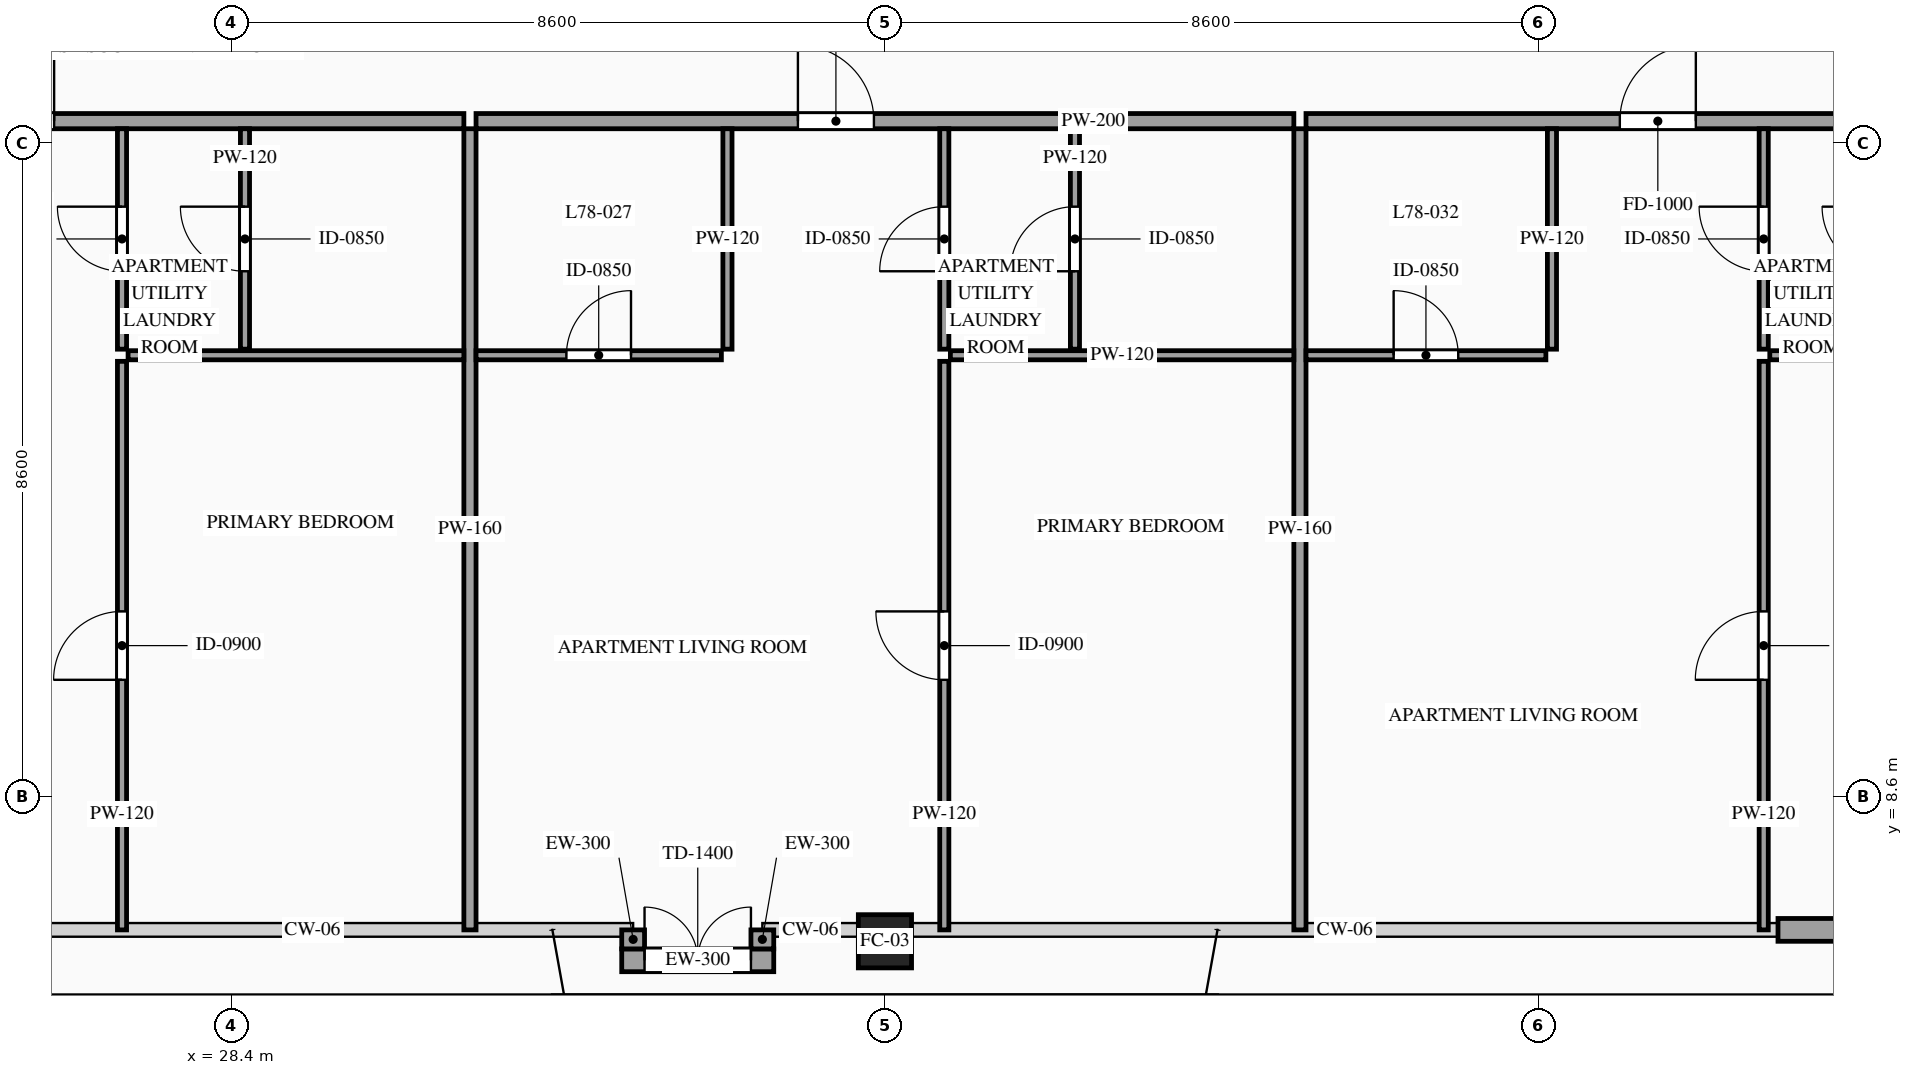
"""IFC4 building model, lengths in metres.
Left out: names, types, materials, properties, quantities, classifications, styles, units other than length and angle.
Written with IfcOpenShell. Run it as: python <this file> out.ifc"""

import sys

from ifc_helpers import new_model, si_unit, direction, frame, frame_2d, origin, origin_2d, place, context, subcontext, project, spatial, rectangle, hollow_rectangle, extrude, source, transform, mapped, element, fill, save


model = new_model("IFC4")
c1 = context("Model", 3, precision=1e-05, world=origin(), true_north=direction((0.0, 1.0)))
c2 = subcontext(c1, "Body", "Model", "MODEL_VIEW")
j1 = project(units=[si_unit("LENGTHUNIT", "METRE"), si_unit("PLANEANGLEUNIT", "RADIAN")], contexts=[c1])
p1 = place(None, origin())
s1 = spatial("IfcSite", under=j1, at=p1, CompositionType="ELEMENT")
p2 = place(p1, origin())
s2 = spatial("IfcBuilding", under=s1, at=p2, CompositionType="ELEMENT")
p3 = place(p2, frame((0.0, 0.0, 292.6)))
s3 = spatial("IfcBuildingStorey", under=s2, at=p3, CompositionType="ELEMENT", Elevation=292.6)
m1 = source(origin(), c2, "Body", "SweptSolid", [
    extrude(hollow_rectangle(XDim=0.7, YDim=0.7, WallThickness=0.032, at=origin_2d()), origin(), (0.0, 0.0, 1.0), 3.5),
])
p4 = place(p3, frame((37.0, 6.7, 0.0), z_axis=(0.0, 0.0, 1.0), x_axis=(1.0, 0.0, 0.0)))
e1 = element("IfcColumn", 1, at=p4, inside=s3, PredefinedType="COLUMN", context=c2, shape_type="MappedRepresentation", body=[
    mapped(m1, transform((0.0, 0.0, 0.0), scale=1.0)),
])
m2 = source(origin(), c2, "Body", "SweptSolid", [
    extrude(rectangle(XDim=3.25, YDim=0.3, at=frame_2d((1.625, 0.0))), origin(), (0.0, 0.0, 1.0), 2.885),
])
p5 = place(p3, frame((48.75, 6.85, 0.0), z_axis=(0.0, 0.0, 1.0), x_axis=(1.0, 0.0, 0.0)))
e2 = element("IfcWall", 2, at=p5, inside=s3, PredefinedType="SOLIDWALL", context=c2, shape_type="MappedRepresentation", body=[
    mapped(m2, transform((0.0, 0.0, 0.0), scale=1.0)),
])
p6 = place(p3, frame((33.537, 6.45, 0.0), z_axis=(0.0, 0.0, 1.0), x_axis=(1.0, 0.0, 0.0)))
e3 = element("IfcWall", 3, at=p6, inside=s3, PredefinedType="SOLIDWALL", context=c2, shape_type="SweptSolid", body=[
    extrude(rectangle(XDim=2.0, YDim=0.3, at=frame_2d((1.0, 0.0))), origin(), (0.0, 0.0, 1.0), 2.885),
])
p7 = place(p6, frame((0.3, 0.0, 0.0)))
e4 = element("IfcOpeningElement", 4, at=p7, cuts=e3, PredefinedType="OPENING", context=c2, shape_type="SweptSolid", body=[
    extrude(rectangle(XDim=1.4, YDim=2.3, at=frame_2d((0.7, 1.15))), frame((0.0, 0.165, 0.0), z_axis=(0.0, -1.0, 0.0), x_axis=(1.0, 0.0, 0.0)), (0.0, 0.0, 1.0), 0.33),
])
m3 = source(origin(), c2, "Body", "SweptSolid", [
    extrude(rectangle(XDim=0.25, YDim=0.3, at=frame_2d((0.125, 0.0))), origin(), (0.0, 0.0, 1.0), 3.28),
])
for number, where, z_axis, x_axis in (
    (5, (33.687, 6.85, 0.0), (0.0, 0.0, 1.0), (0.0, -1.0, 0.0)),
    (6, (35.387, 6.6, 0.0), (0.0, 0.0, 1.0), (0.0, 1.0, 0.0)),
):
    element("IfcWall", number, at=place(p3, frame(where, z_axis=z_axis, x_axis=x_axis)), inside=s3, PredefinedType="SOLIDWALL", context=c2, shape_type="MappedRepresentation", body=[
        mapped(m3, transform((0.0, 0.0, 0.0), scale=1.0)),
    ])
p8 = place(p3, frame((20.94, 17.49, 0.0), z_axis=(0.0, 0.0, 1.0), x_axis=(1.0, 0.0, 0.0)))
e7 = element("IfcWall", 7, at=p8, inside=s3, PredefinedType="PARTITIONING", context=c2, shape_type="SweptSolid", body=[
    extrude(rectangle(XDim=10.52, YDim=0.2, at=frame_2d((5.26, 0.0))), origin(), (0.0, 0.0, 1.0), 3.28),
])
p9 = place(p8, frame((4.129, 0.0, 0.0)))
e8 = element("IfcOpeningElement", 8, at=p9, cuts=e7, PredefinedType="OPENING", context=c2, shape_type="SweptSolid", body=[
    extrude(rectangle(XDim=1.0, YDim=2.2, at=frame_2d((0.5, 1.1))), frame((0.0, 0.115, 0.0), z_axis=(0.0, -1.0, 0.0), x_axis=(1.0, 0.0, 0.0)), (0.0, 0.0, 1.0), 0.23),
])
m4 = source(origin(), c2, "Body", "SweptSolid", [
    extrude(rectangle(XDim=10.54, YDim=0.16, at=frame_2d((5.27, 0.0))), origin(), (0.0, 0.0, 1.0), 3.28),
])
p10 = place(p3, frame((31.54, 6.85, 0.0), z_axis=(0.0, 0.0, 1.0), x_axis=(0.0, 1.0, 0.0)))
e9 = element("IfcWall", 9, at=p10, inside=s3, PredefinedType="PARTITIONING", context=c2, shape_type="MappedRepresentation", body=[
    mapped(m4, transform((0.0, 0.0, 0.0), scale=1.0)),
])
p11 = place(p3, frame((28.58, 14.49, 0.0), z_axis=(0.0, 0.0, 1.0), x_axis=(0.0, 1.0, 0.0)))
e10 = element("IfcWall", 10, at=p11, inside=s3, PredefinedType="PARTITIONING", context=c2, shape_type="SweptSolid", body=[
    extrude(rectangle(XDim=2.9, YDim=0.12, at=frame_2d((1.45, 0.0))), origin(), (0.0, 0.0, 1.0), 3.28),
])
p12 = place(p11, frame((1.025, 0.0, 0.0)))
e11 = element("IfcOpeningElement", 11, at=p12, cuts=e10, PredefinedType="OPENING", context=c2, shape_type="SweptSolid", body=[
    extrude(rectangle(XDim=0.85, YDim=2.1, at=frame_2d((0.425, 1.05))), frame((0.0, 0.075, 0.0), z_axis=(0.0, -1.0, 0.0), x_axis=(1.0, 0.0, 0.0)), (0.0, 0.0, 1.0), 0.15),
])
m5 = source(origin(), c2, "Body", "SweptSolid", [
    extrude(rectangle(XDim=4.418, YDim=0.12, at=frame_2d((2.209, 0.0))), origin(), (0.0, 0.0, 1.0), 3.28),
])
p13 = place(p3, frame((27.042, 14.41, 0.0), z_axis=(0.0, 0.0, 1.0), x_axis=(1.0, 0.0, 0.0)))
e12 = element("IfcWall", 12, at=p13, inside=s3, PredefinedType="PARTITIONING", context=c2, shape_type="MappedRepresentation", body=[
    mapped(m5, transform((0.0, 0.0, 0.0), scale=1.0)),
])
p14 = place(p3, frame((26.962, 6.85, 0.0), z_axis=(0.0, 0.0, 1.0), x_axis=(0.0, 1.0, 0.0)))
e13 = element("IfcWall", 13, at=p14, inside=s3, PredefinedType="PARTITIONING", context=c2, shape_type="SweptSolid", body=[
    extrude(rectangle(XDim=7.48, YDim=0.12, at=frame_2d((3.74, 0.0))), origin(), (0.0, 0.0, 1.0), 3.28),
])
p15 = place(p14, frame((3.29, 0.0, 0.0)))
e14 = element("IfcOpeningElement", 14, at=p15, cuts=e13, PredefinedType="OPENING", context=c2, shape_type="SweptSolid", body=[
    extrude(rectangle(XDim=0.9, YDim=2.15, at=frame_2d((0.45, 1.075))), frame((0.0, 0.075, 0.0), z_axis=(0.0, -1.0, 0.0), x_axis=(1.0, 0.0, 0.0)), (0.0, 0.0, 1.0), 0.15),
])
p16 = place(p3, frame((26.962, 14.49, 0.0), z_axis=(0.0, 0.0, 1.0), x_axis=(0.0, 1.0, 0.0)))
e15 = element("IfcWall", 15, at=p16, inside=s3, PredefinedType="PARTITIONING", context=c2, shape_type="SweptSolid", body=[
    extrude(rectangle(XDim=2.9, YDim=0.12, at=frame_2d((1.45, 0.0))), origin(), (0.0, 0.0, 1.0), 3.28),
])
p17 = place(p16, frame((1.025, 0.0, 0.0)))
e16 = element("IfcOpeningElement", 16, at=p17, cuts=e15, PredefinedType="OPENING", context=c2, shape_type="SweptSolid", body=[
    extrude(rectangle(XDim=0.85, YDim=2.1, at=frame_2d((0.425, 1.05))), frame((0.0, 0.075, 0.0), z_axis=(0.0, -1.0, 0.0), x_axis=(1.0, 0.0, 0.0)), (0.0, 0.0, 1.0), 0.15),
])
p18 = place(p3, frame((31.62, 17.49, 0.0), z_axis=(0.0, 0.0, 1.0), x_axis=(1.0, 0.0, 0.0)))
e17 = element("IfcWall", 17, at=p18, inside=s3, PredefinedType="PARTITIONING", context=c2, shape_type="SweptSolid", body=[
    extrude(rectangle(XDim=10.76, YDim=0.2, at=frame_2d((5.38, 0.0))), origin(), (0.0, 0.0, 1.0), 3.28),
])
p19 = place(p18, frame((4.235, 0.0, 0.0)))
e18 = element("IfcOpeningElement", 18, at=p19, cuts=e17, PredefinedType="OPENING", context=c2, shape_type="SweptSolid", body=[
    extrude(rectangle(XDim=1.0, YDim=2.2, at=frame_2d((0.5, 1.1))), frame((0.0, 0.115, 0.0), z_axis=(0.0, -1.0, 0.0), x_axis=(1.0, 0.0, 0.0)), (0.0, 0.0, 1.0), 0.23),
])
p20 = place(p3, frame((42.46, 6.85, 0.0), z_axis=(0.0, 0.0, 1.0), x_axis=(0.0, 1.0, 0.0)))
e19 = element("IfcWall", 19, at=p20, inside=s3, PredefinedType="PARTITIONING", context=c2, shape_type="MappedRepresentation", body=[
    mapped(m4, transform((0.0, 0.0, 0.0), scale=1.0)),
])
p21 = place(p3, frame((31.62, 14.41, 0.0), z_axis=(0.0, 0.0, 1.0), x_axis=(1.0, 0.0, 0.0)))
e20 = element("IfcWall", 20, at=p21, inside=s3, PredefinedType="PARTITIONING", context=c2, shape_type="SweptSolid", body=[
    extrude(rectangle(XDim=3.228, YDim=0.12, at=frame_2d((1.614, 0.0))), origin(), (0.0, 0.0, 1.0), 3.28),
])
p22 = place(p21, frame((1.189, 0.0, 0.0)))
e21 = element("IfcOpeningElement", 21, at=p22, cuts=e20, PredefinedType="OPENING", context=c2, shape_type="SweptSolid", body=[
    extrude(rectangle(XDim=0.85, YDim=2.1, at=frame_2d((0.425, 1.05))), frame((0.0, 0.075, 0.0), z_axis=(0.0, -1.0, 0.0), x_axis=(1.0, 0.0, 0.0)), (0.0, 0.0, 1.0), 0.15),
])
m6 = source(origin(), c2, "Body", "SweptSolid", [
    extrude(rectangle(XDim=2.9, YDim=0.12, at=frame_2d((1.45, 0.0))), origin(), (0.0, 0.0, 1.0), 3.28),
])
p23 = place(p3, frame((34.928, 14.49, 0.0), z_axis=(0.0, 0.0, 1.0), x_axis=(0.0, 1.0, 0.0)))
e22 = element("IfcWall", 22, at=p23, inside=s3, PredefinedType="PARTITIONING", context=c2, shape_type="MappedRepresentation", body=[
    mapped(m6, transform((0.0, 0.0, 0.0), scale=1.0)),
])
p24 = place(p3, frame((39.5, 14.49, 0.0), z_axis=(0.0, 0.0, 1.0), x_axis=(0.0, 1.0, 0.0)))
e23 = element("IfcWall", 23, at=p24, inside=s3, PredefinedType="PARTITIONING", context=c2, shape_type="SweptSolid", body=[
    extrude(rectangle(XDim=2.9, YDim=0.12, at=frame_2d((1.45, 0.0))), origin(), (0.0, 0.0, 1.0), 3.28),
])
p25 = place(p24, frame((1.025, 0.0, 0.0)))
e24 = element("IfcOpeningElement", 24, at=p25, cuts=e23, PredefinedType="OPENING", context=c2, shape_type="SweptSolid", body=[
    extrude(rectangle(XDim=0.85, YDim=2.1, at=frame_2d((0.425, 1.05))), frame((0.0, 0.075, 0.0), z_axis=(0.0, -1.0, 0.0), x_axis=(1.0, 0.0, 0.0)), (0.0, 0.0, 1.0), 0.15),
])
m7 = source(origin(), c2, "Body", "SweptSolid", [
    extrude(rectangle(XDim=4.519, YDim=0.12, at=frame_2d((2.259, 0.0))), origin(), (0.0, 0.0, 1.0), 3.28),
])
p26 = place(p3, frame((37.861, 14.41, 0.0), z_axis=(0.0, 0.0, 1.0), x_axis=(1.0, 0.0, 0.0)))
e25 = element("IfcWall", 25, at=p26, inside=s3, PredefinedType="PARTITIONING", context=c2, shape_type="MappedRepresentation", body=[
    mapped(m7, transform((0.0, 0.0, 0.0), scale=1.0)),
])
p27 = place(p3, frame((37.781, 6.85, 0.0), z_axis=(0.0, 0.0, 1.0), x_axis=(0.0, 1.0, 0.0)))
e26 = element("IfcWall", 26, at=p27, inside=s3, PredefinedType="PARTITIONING", context=c2, shape_type="SweptSolid", body=[
    extrude(rectangle(XDim=7.48, YDim=0.12, at=frame_2d((3.74, 0.0))), origin(), (0.0, 0.0, 1.0), 3.28),
])
p28 = place(p27, frame((3.29, 0.0, 0.0)))
e27 = element("IfcOpeningElement", 27, at=p28, cuts=e26, PredefinedType="OPENING", context=c2, shape_type="SweptSolid", body=[
    extrude(rectangle(XDim=0.9, YDim=2.15, at=frame_2d((0.45, 1.075))), frame((0.0, 0.075, 0.0), z_axis=(0.0, -1.0, 0.0), x_axis=(1.0, 0.0, 0.0)), (0.0, 0.0, 1.0), 0.15),
])
p29 = place(p3, frame((37.781, 14.49, 0.0), z_axis=(0.0, 0.0, 1.0), x_axis=(0.0, 1.0, 0.0)))
e28 = element("IfcWall", 28, at=p29, inside=s3, PredefinedType="PARTITIONING", context=c2, shape_type="SweptSolid", body=[
    extrude(rectangle(XDim=2.9, YDim=0.12, at=frame_2d((1.45, 0.0))), origin(), (0.0, 0.0, 1.0), 3.28),
])
p30 = place(p29, frame((1.025, 0.0, 0.0)))
e29 = element("IfcOpeningElement", 29, at=p30, cuts=e28, PredefinedType="OPENING", context=c2, shape_type="SweptSolid", body=[
    extrude(rectangle(XDim=0.85, YDim=2.1, at=frame_2d((0.425, 1.05))), frame((0.0, 0.075, 0.0), z_axis=(0.0, -1.0, 0.0), x_axis=(1.0, 0.0, 0.0)), (0.0, 0.0, 1.0), 0.15),
])
p31 = place(p3, frame((42.54, 17.49, 0.0), z_axis=(0.0, 0.0, 1.0), x_axis=(1.0, 0.0, 0.0)))
e30 = element("IfcWall", 30, at=p31, inside=s3, PredefinedType="PARTITIONING", context=c2, shape_type="SweptSolid", body=[
    extrude(rectangle(XDim=10.52, YDim=0.2, at=frame_2d((5.26, 0.0))), origin(), (0.0, 0.0, 1.0), 3.28),
])
p32 = place(p31, frame((4.129, 0.0, 0.0)))
e31 = element("IfcOpeningElement", 31, at=p32, cuts=e30, PredefinedType="OPENING", context=c2, shape_type="SweptSolid", body=[
    extrude(rectangle(XDim=1.0, YDim=2.2, at=frame_2d((0.5, 1.1))), frame((0.0, 0.115, 0.0), z_axis=(0.0, -1.0, 0.0), x_axis=(1.0, 0.0, 0.0)), (0.0, 0.0, 1.0), 0.23),
])
p33 = place(p3, frame((42.54, 14.41, 0.0), z_axis=(0.0, 0.0, 1.0), x_axis=(1.0, 0.0, 0.0)))
e32 = element("IfcWall", 32, at=p33, inside=s3, PredefinedType="PARTITIONING", context=c2, shape_type="SweptSolid", body=[
    extrude(rectangle(XDim=3.156, YDim=0.12, at=frame_2d((1.578, 0.0))), origin(), (0.0, 0.0, 1.0), 3.28),
])
p34 = place(p33, frame((1.153, 0.0, 0.0)))
e33 = element("IfcOpeningElement", 33, at=p34, cuts=e32, PredefinedType="OPENING", context=c2, shape_type="SweptSolid", body=[
    extrude(rectangle(XDim=0.85, YDim=2.1, at=frame_2d((0.425, 1.05))), frame((0.0, 0.075, 0.0), z_axis=(0.0, -1.0, 0.0), x_axis=(1.0, 0.0, 0.0)), (0.0, 0.0, 1.0), 0.15),
])
p35 = place(p3, frame((45.776, 14.49, 0.0), z_axis=(0.0, 0.0, 1.0), x_axis=(0.0, 1.0, 0.0)))
e34 = element("IfcWall", 34, at=p35, inside=s3, PredefinedType="PARTITIONING", context=c2, shape_type="MappedRepresentation", body=[
    mapped(m6, transform((0.0, 0.0, 0.0), scale=1.0)),
])
p36 = place(p3, frame((48.642, 14.41, 0.0), z_axis=(0.0, 0.0, 1.0), x_axis=(1.0, 0.0, 0.0)))
e35 = element("IfcWall", 35, at=p36, inside=s3, PredefinedType="PARTITIONING", context=c2, shape_type="MappedRepresentation", body=[
    mapped(m5, transform((0.0, 0.0, 0.0), scale=1.0)),
])
p37 = place(p3, frame((48.562, 6.85, 0.0), z_axis=(0.0, 0.0, 1.0), x_axis=(0.0, 1.0, 0.0)))
e36 = element("IfcWall", 36, at=p37, inside=s3, PredefinedType="PARTITIONING", context=c2, shape_type="SweptSolid", body=[
    extrude(rectangle(XDim=7.48, YDim=0.12, at=frame_2d((3.74, 0.0))), origin(), (0.0, 0.0, 1.0), 3.28),
])
p38 = place(p37, frame((3.29, 0.0, 0.0)))
e37 = element("IfcOpeningElement", 37, at=p38, cuts=e36, PredefinedType="OPENING", context=c2, shape_type="SweptSolid", body=[
    extrude(rectangle(XDim=0.9, YDim=2.15, at=frame_2d((0.45, 1.075))), frame((0.0, 0.075, 0.0), z_axis=(0.0, -1.0, 0.0), x_axis=(1.0, 0.0, 0.0)), (0.0, 0.0, 1.0), 0.15),
])
p39 = place(p3, frame((48.562, 14.49, 0.0), z_axis=(0.0, 0.0, 1.0), x_axis=(0.0, 1.0, 0.0)))
e38 = element("IfcWall", 38, at=p39, inside=s3, PredefinedType="PARTITIONING", context=c2, shape_type="SweptSolid", body=[
    extrude(rectangle(XDim=2.9, YDim=0.12, at=frame_2d((1.45, 0.0))), origin(), (0.0, 0.0, 1.0), 3.28),
])
p40 = place(p39, frame((1.025, 0.0, 0.0)))
e39 = element("IfcOpeningElement", 39, at=p40, cuts=e38, PredefinedType="OPENING", context=c2, shape_type="SweptSolid", body=[
    extrude(rectangle(XDim=0.85, YDim=2.1, at=frame_2d((0.425, 1.05))), frame((0.0, 0.075, 0.0), z_axis=(0.0, -1.0, 0.0), x_axis=(1.0, 0.0, 0.0)), (0.0, 0.0, 1.0), 0.15),
])
m8 = source(origin(), c2, "Body", "SweptSolid", [
    extrude(rectangle(XDim=1.4, YDim=2.3, at=frame_2d((0.7, 1.15))), frame((0.0, 0.025, 0.0), z_axis=(0.0, -1.0, 0.0), x_axis=(1.0, 0.0, 0.0)), (0.0, 0.0, 1.0), 0.05),
])
p41 = place(p7, origin())
e40 = element("IfcDoor", 40, at=p41, inside=s3, OperationType="DOUBLE_DOOR_SINGLE_SWING", PredefinedType="DOOR", context=c2, shape_type="MappedRepresentation", body=[
    mapped(m8, transform((0.0, 0.0, 0.0), scale=1.0)),
])
fill(e4, e40)
m9 = source(origin(), c2, "Body", "SweptSolid", [
    extrude(rectangle(XDim=1.0, YDim=2.2, at=frame_2d((0.5, 1.1))), frame((0.0, 0.025, 0.0), z_axis=(0.0, -1.0, 0.0), x_axis=(1.0, 0.0, 0.0)), (0.0, 0.0, 1.0), 0.05),
])
p42 = place(p9, origin())
e41 = element("IfcDoor", 41, at=p42, inside=s3, OperationType="SINGLE_SWING_RIGHT", PredefinedType="DOOR", context=c2, shape_type="MappedRepresentation", body=[
    mapped(m9, transform((0.0, 0.0, 0.0), scale=1.0)),
])
fill(e8, e41)
m10 = source(origin(), c2, "Body", "SweptSolid", [
    extrude(rectangle(XDim=0.85, YDim=2.1, at=frame_2d((0.425, 1.05))), frame((0.0, 0.025, 0.0), z_axis=(0.0, -1.0, 0.0), x_axis=(1.0, 0.0, 0.0)), (0.0, 0.0, 1.0), 0.05),
])
p43 = place(p12, origin())
e42 = element("IfcDoor", 42, at=p43, inside=s3, OperationType="SINGLE_SWING_RIGHT", PredefinedType="DOOR", context=c2, shape_type="MappedRepresentation", body=[
    mapped(m10, transform((0.0, 0.0, 0.0), scale=1.0)),
])
fill(e11, e42)
m11 = source(origin(), c2, "Body", "SweptSolid", [
    extrude(rectangle(XDim=0.9, YDim=2.15, at=frame_2d((0.45, 1.075))), frame((0.0, 0.025, 0.0), z_axis=(0.0, -1.0, 0.0), x_axis=(1.0, 0.0, 0.0)), (0.0, 0.0, 1.0), 0.05),
])
p44 = place(p15, origin())
e43 = element("IfcDoor", 43, at=p44, inside=s3, OperationType="SINGLE_SWING_LEFT", PredefinedType="DOOR", context=c2, shape_type="MappedRepresentation", body=[
    mapped(m11, transform((0.0, 0.0, 0.0), scale=1.0)),
])
fill(e14, e43)
p45 = place(p17, origin())
e44 = element("IfcDoor", 44, at=p45, inside=s3, OperationType="SINGLE_SWING_RIGHT", PredefinedType="DOOR", context=c2, shape_type="MappedRepresentation", body=[
    mapped(m10, transform((0.0, 0.0, 0.0), scale=1.0)),
])
fill(e16, e44)
p46 = place(p19, origin())
e45 = element("IfcDoor", 45, at=p46, inside=s3, OperationType="SINGLE_SWING_LEFT", PredefinedType="DOOR", context=c2, shape_type="MappedRepresentation", body=[
    mapped(m9, transform((0.0, 0.0, 0.0), scale=1.0)),
])
fill(e18, e45)
p47 = place(p22, origin())
e46 = element("IfcDoor", 46, at=p47, inside=s3, OperationType="SINGLE_SWING_RIGHT", PredefinedType="DOOR", context=c2, shape_type="MappedRepresentation", body=[
    mapped(m10, transform((0.0, 0.0, 0.0), scale=1.0)),
])
fill(e21, e46)
p48 = place(p25, origin())
e47 = element("IfcDoor", 47, at=p48, inside=s3, OperationType="SINGLE_SWING_LEFT", PredefinedType="DOOR", context=c2, shape_type="MappedRepresentation", body=[
    mapped(m10, transform((0.0, 0.0, 0.0), scale=1.0)),
])
fill(e24, e47)
p49 = place(p28, origin())
e48 = element("IfcDoor", 48, at=p49, inside=s3, OperationType="SINGLE_SWING_RIGHT", PredefinedType="DOOR", context=c2, shape_type="MappedRepresentation", body=[
    mapped(m11, transform((0.0, 0.0, 0.0), scale=1.0)),
])
fill(e27, e48)
p50 = place(p30, origin())
e49 = element("IfcDoor", 49, at=p50, inside=s3, OperationType="SINGLE_SWING_LEFT", PredefinedType="DOOR", context=c2, shape_type="MappedRepresentation", body=[
    mapped(m10, transform((0.0, 0.0, 0.0), scale=1.0)),
])
fill(e29, e49)
p51 = place(p32, origin())
e50 = element("IfcDoor", 50, at=p51, inside=s3, OperationType="SINGLE_SWING_RIGHT", PredefinedType="DOOR", context=c2, shape_type="MappedRepresentation", body=[
    mapped(m9, transform((0.0, 0.0, 0.0), scale=1.0)),
])
fill(e31, e50)
p52 = place(p34, origin())
e51 = element("IfcDoor", 51, at=p52, inside=s3, OperationType="SINGLE_SWING_LEFT", PredefinedType="DOOR", context=c2, shape_type="MappedRepresentation", body=[
    mapped(m10, transform((0.0, 0.0, 0.0), scale=1.0)),
])
fill(e33, e51)
p53 = place(p38, origin())
e52 = element("IfcDoor", 52, at=p53, inside=s3, OperationType="SINGLE_SWING_LEFT", PredefinedType="DOOR", context=c2, shape_type="MappedRepresentation", body=[
    mapped(m11, transform((0.0, 0.0, 0.0), scale=1.0)),
])
fill(e37, e52)
p54 = place(p40, origin())
e53 = element("IfcDoor", 53, at=p54, inside=s3, OperationType="SINGLE_SWING_RIGHT", PredefinedType="DOOR", context=c2, shape_type="MappedRepresentation", body=[
    mapped(m10, transform((0.0, 0.0, 0.0), scale=1.0)),
])
fill(e39, e53)
save(model, sys.argv[1])
